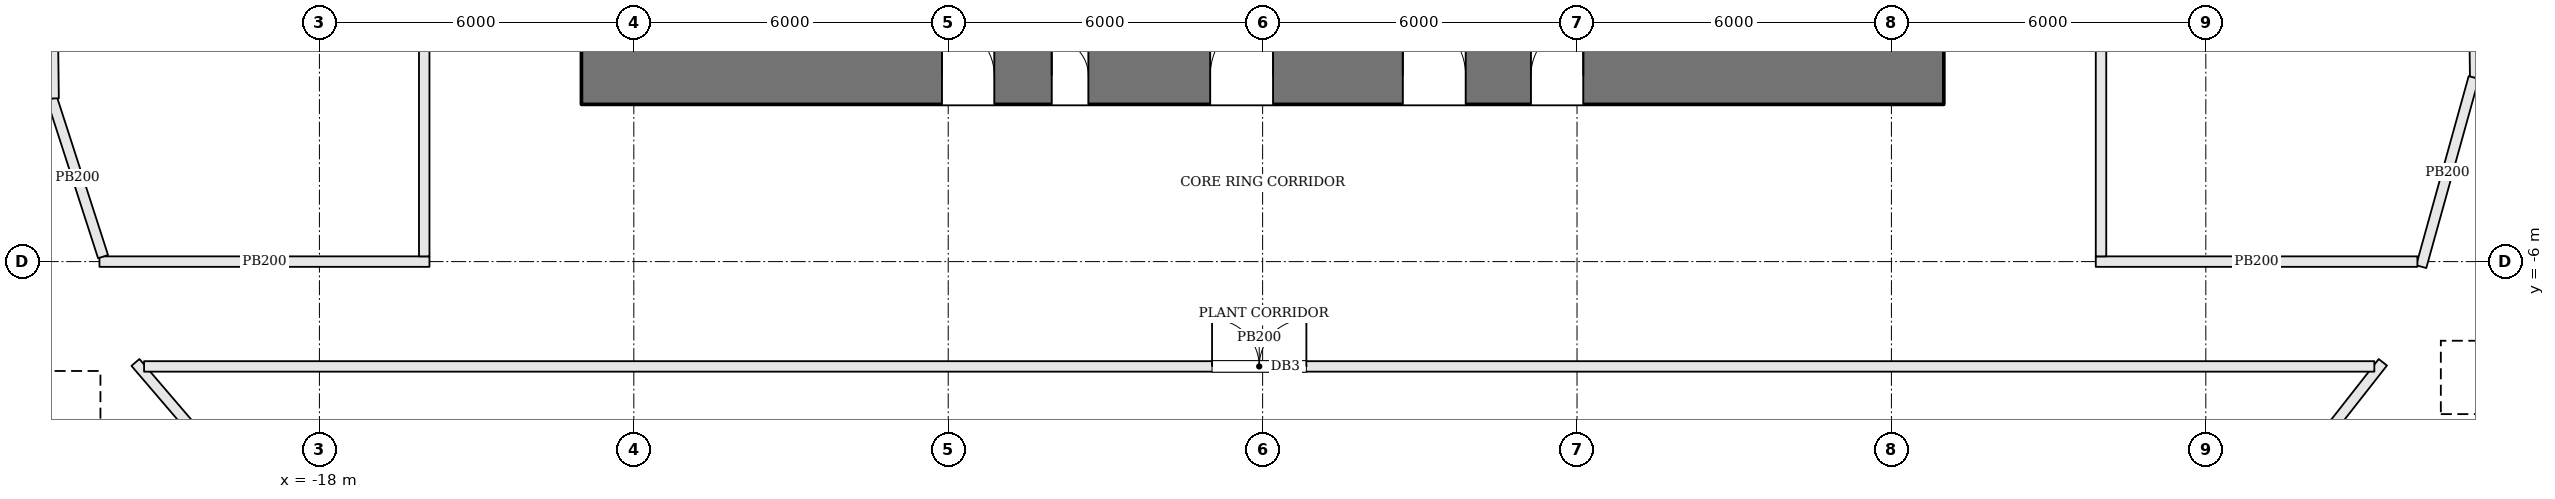
"""IFC4 building model, lengths in metres.
Left out: names, types, materials, properties, quantities, classifications, styles, units other than length and angle.
Written with IfcOpenShell. Run it as: python <this file> out.ifc"""

import sys

from ifc_helpers import new_model, si_unit, direction, frame, frame_2d, origin, origin_2d, place, context, subcontext, project, spatial, rectangle, extrude, element, fill, save


model = new_model("IFC4")
c1 = context("Model", 3, precision=1e-05, world=origin(), true_north=direction((0.0, 1.0)))
c2 = subcontext(c1, "Body", "Model", "MODEL_VIEW")
j1 = project(units=[si_unit("LENGTHUNIT", "METRE"), si_unit("PLANEANGLEUNIT", "RADIAN")], contexts=[c1])
p1 = place(None, origin())
s1 = spatial("IfcSite", under=j1, at=p1, CompositionType="ELEMENT")
p2 = place(p1, origin())
s2 = spatial("IfcBuilding", under=s1, at=p2, CompositionType="ELEMENT")
p3 = place(p2, frame((0.0, 0.0, 77.1)))
s3 = spatial("IfcBuildingStorey", under=s2, at=p3, CompositionType="ELEMENT", Elevation=77.1)
p4 = place(p3, frame((-13.0, -2.45, 0.0), z_axis=(0.0, 0.0, 1.0), x_axis=(1.0, 0.0, 0.0)))
e1 = element("IfcWall", 1, at=p4, inside=s3, PredefinedType="SHEAR", context=c2, shape_type="SweptSolid", body=[
    extrude(rectangle(XDim=26.0, YDim=1.1, at=frame_2d((13.0, 0.0))), origin(), (0.0, 0.0, 1.0), 4.5),
])
p5 = place(p4, frame((8.975, 0.0, 0.0)))
e2 = element("IfcOpeningElement", 2, at=p5, cuts=e1, PredefinedType="OPENING", context=c2, shape_type="SweptSolid", body=[
    extrude(rectangle(XDim=0.7, YDim=2.1, at=frame_2d((0.35, 1.05))), frame((0.0, 0.56, 0.0), z_axis=(0.0, -1.0, 0.0), x_axis=(1.0, 0.0, 0.0)), (0.0, 0.0, 1.0), 1.12),
])
p6 = place(p4, frame((12.0, 0.0, 0.0)))
e3 = element("IfcOpeningElement", 3, at=p6, cuts=e1, PredefinedType="OPENING", context=c2, shape_type="SweptSolid", body=[
    extrude(rectangle(XDim=1.2, YDim=2.1, at=frame_2d((0.6, 1.05))), frame((0.0, 0.56, 0.0), z_axis=(0.0, -1.0, 0.0), x_axis=(1.0, 0.0, 0.0)), (0.0, 0.0, 1.0), 1.12),
])
p7 = place(p4, frame((15.675, 0.0, 0.0)))
e4 = element("IfcOpeningElement", 4, at=p7, cuts=e1, PredefinedType="OPENING", context=c2, shape_type="SweptSolid", body=[
    extrude(rectangle(XDim=1.2, YDim=2.1, at=frame_2d((0.6, 1.05))), frame((0.0, 0.56, 0.0), z_axis=(0.0, -1.0, 0.0), x_axis=(1.0, 0.0, 0.0)), (0.0, 0.0, 1.0), 1.12),
])
p8 = place(p4, frame((6.88, 0.0, 0.0)))
e5 = element("IfcOpeningElement", 5, at=p8, cuts=e1, PredefinedType="OPENING", context=c2, shape_type="SweptSolid", body=[
    extrude(rectangle(XDim=1.0, YDim=2.1, at=frame_2d((0.5, 1.05))), frame((0.0, 0.56, 0.0), z_axis=(0.0, -1.0, 0.0), x_axis=(1.0, 0.0, 0.0)), (0.0, 0.0, 1.0), 1.12),
])
p9 = place(p4, frame((18.12, 0.0, 0.0)))
e6 = element("IfcOpeningElement", 6, at=p9, cuts=e1, PredefinedType="OPENING", context=c2, shape_type="SweptSolid", body=[
    extrude(rectangle(XDim=1.0, YDim=2.1, at=frame_2d((0.5, 1.05))), frame((0.0, 0.56, 0.0), z_axis=(0.0, -1.0, 0.0), x_axis=(1.0, 0.0, 0.0)), (0.0, 0.0, 1.0), 1.12),
])
p10 = place(p3, frame((-24.676, -9.483, -0.49), z_axis=(0.406404807836, 0.157350047865, 0.900042273787), x_axis=(-0.361058075799, 0.932543331915, 0.0)))
e7 = element("IfcColumn", 7, at=p10, inside=s3, PredefinedType="COLUMN", context=c2, shape_type="SweptSolid", body=[
    extrude(rectangle(XDim=1.4, YDim=1.4, at=origin_2d()), origin(), (0.0, 0.0, 1.0), 4.422),
])
p11 = place(p3, frame((25.003, -8.866, -0.489), z_axis=(-0.411038008835, 0.148329187448, 0.899469959167), x_axis=(-0.339439573807, -0.940627862512, 0.0)))
e8 = element("IfcColumn", 8, at=p11, inside=s3, PredefinedType="COLUMN", context=c2, shape_type="SweptSolid", body=[
    extrude(rectangle(XDim=1.4, YDim=1.4, at=origin_2d()), origin(), (0.0, 0.0, 1.0), 4.423),
])
p12 = place(p3, frame((21.378, -7.921, 0.0), z_axis=(0.0, 0.0, 1.0), x_axis=(-0.61707944402, -0.786900857649, 0.0)))
e9 = element("IfcWall", 9, at=p12, inside=s3, PredefinedType="PARTITIONING", context=c2, shape_type="SweptSolid", body=[
    extrude(rectangle(XDim=4.753, YDim=0.2, at=frame_2d((2.376, 0.0))), origin(), (0.0, 0.0, 1.0), 4.3),
])
p13 = place(p3, frame((-18.119, -11.885, 0.0), z_axis=(0.0, 0.0, 1.0), x_axis=(-0.650459744862, 0.759540729858, 0.0)))
e10 = element("IfcWall", 10, at=p13, inside=s3, PredefinedType="PARTITIONING", context=c2, shape_type="SweptSolid", body=[
    extrude(rectangle(XDim=5.215, YDim=0.2, at=frame_2d((2.607, 0.0))), origin(), (0.0, 0.0, 1.0), 4.3),
])
p14 = place(p3, frame((-21.346, -8.0, 0.0), z_axis=(0.0, 0.0, 1.0), x_axis=(1.0, 0.0, 0.0)))
e11 = element("IfcWall", 11, at=p14, inside=s3, PredefinedType="PARTITIONING", context=c2, shape_type="SweptSolid", body=[
    extrude(rectangle(XDim=42.562, YDim=0.2, at=frame_2d((21.281, 0.0))), origin(), (0.0, 0.0, 1.0), 4.3),
])
p15 = place(p14, frame((20.381, 0.0, 0.0)))
e12 = element("IfcOpeningElement", 12, at=p15, cuts=e11, PredefinedType="OPENING", context=c2, shape_type="SweptSolid", body=[
    extrude(rectangle(XDim=1.8, YDim=2.1, at=frame_2d((0.9, 1.05))), frame((0.0, 0.11, 0.0), z_axis=(0.0, -1.0, 0.0), x_axis=(1.0, 0.0, 0.0)), (0.0, 0.0, 1.0), 0.22),
])
p16 = place(p3, frame((-15.9, -6.0, 0.0), z_axis=(0.0, 0.0, 1.0), x_axis=(-1.0, 0.0, 0.0)))
e13 = element("IfcWall", 13, at=p16, inside=s3, PredefinedType="PARTITIONING", context=c2, shape_type="SweptSolid", body=[
    extrude(rectangle(XDim=6.298, YDim=0.2, at=frame_2d((3.149, 0.0))), origin(), (0.0, 0.0, 1.0), 4.3),
])
p17 = place(p3, frame((-22.129, -5.905, 0.0), z_axis=(0.0, 0.0, 1.0), x_axis=(-0.307543224341, 0.951534111402, 0.0)))
e14 = element("IfcWall", 14, at=p17, inside=s3, PredefinedType="PARTITIONING", context=c2, shape_type="SweptSolid", body=[
    extrude(rectangle(XDim=3.167, YDim=0.2, at=frame_2d((1.584, 0.0))), origin(), (0.0, 0.0, 1.0), 4.3),
])
p18 = place(p3, frame((-23.073, -2.886, 0.0), z_axis=(0.0, 0.0, 1.0), x_axis=(-0.012666982201, 0.999919770563, 0.0)))
e15 = element("IfcWall", 15, at=p18, inside=s3, PredefinedType="PARTITIONING", context=c2, shape_type="SweptSolid", body=[
    extrude(rectangle(XDim=5.377, YDim=0.2, at=frame_2d((2.689, 0.0))), origin(), (0.0, 0.0, 1.0), 4.3),
])
p19 = place(p3, frame((-16.0, 13.047, 0.0), z_axis=(0.0, 0.0, 1.0), x_axis=(0.0, -1.0, 0.0)))
e16 = element("IfcWall", 16, at=p19, inside=s3, PredefinedType="PARTITIONING", context=c2, shape_type="SweptSolid", body=[
    extrude(rectangle(XDim=18.947, YDim=0.2, at=frame_2d((9.474, 0.0))), origin(), (0.0, 0.0, 1.0), 4.3),
])
p20 = place(p19, frame((7.647, 0.0, 0.0)))
e17 = element("IfcOpeningElement", 17, at=p20, cuts=e16, PredefinedType="OPENING", context=c2, shape_type="SweptSolid", body=[
    extrude(rectangle(XDim=1.8, YDim=2.1, at=frame_2d((0.9, 1.05))), frame((0.0, 0.11, 0.0), z_axis=(0.0, -1.0, 0.0), x_axis=(1.0, 0.0, 0.0)), (0.0, 0.0, 1.0), 0.22),
])
p21 = place(p3, frame((23.073, 2.886, 0.0), z_axis=(0.0, 0.0, 1.0), x_axis=(0.012666982201, -0.999919770563, 0.0)))
e18 = element("IfcWall", 18, at=p21, inside=s3, PredefinedType="PARTITIONING", context=c2, shape_type="SweptSolid", body=[
    extrude(rectangle(XDim=5.377, YDim=0.2, at=frame_2d((2.689, 0.0))), origin(), (0.0, 0.0, 1.0), 4.3),
])
p22 = place(p3, frame((23.113, -2.487, 0.0), z_axis=(0.0, 0.0, 1.0), x_axis=(-0.2675161078, -0.963553388281, 0.0)))
e19 = element("IfcWall", 19, at=p22, inside=s3, PredefinedType="PARTITIONING", context=c2, shape_type="SweptSolid", body=[
    extrude(rectangle(XDim=3.745, YDim=0.2, at=frame_2d((1.873, 0.0))), origin(), (0.0, 0.0, 1.0), 4.3),
])
p23 = place(p3, frame((22.038, -6.0, 0.0), z_axis=(0.0, 0.0, 1.0), x_axis=(-1.0, 0.0, 0.0)))
e20 = element("IfcWall", 20, at=p23, inside=s3, PredefinedType="PARTITIONING", context=c2, shape_type="SweptSolid", body=[
    extrude(rectangle(XDim=6.138, YDim=0.2, at=frame_2d((3.069, 0.0))), origin(), (0.0, 0.0, 1.0), 4.3),
])
p24 = place(p3, frame((16.0, -5.9, 0.0), z_axis=(0.0, 0.0, 1.0), x_axis=(0.0, 1.0, 0.0)))
e21 = element("IfcWall", 21, at=p24, inside=s3, PredefinedType="PARTITIONING", context=c2, shape_type="SweptSolid", body=[
    extrude(rectangle(XDim=18.952, YDim=0.2, at=frame_2d((9.476, 0.0))), origin(), (0.0, 0.0, 1.0), 4.3),
])
p25 = place(p24, frame((9.5, 0.0, 0.0)))
e22 = element("IfcOpeningElement", 22, at=p25, cuts=e21, PredefinedType="OPENING", context=c2, shape_type="SweptSolid", body=[
    extrude(rectangle(XDim=1.8, YDim=2.1, at=frame_2d((0.9, 1.05))), frame((0.0, 0.11, 0.0), z_axis=(0.0, -1.0, 0.0), x_axis=(1.0, 0.0, 0.0)), (0.0, 0.0, 1.0), 0.22),
])
p26 = place(p5, origin())
e23 = element("IfcDoor", 23, at=p26, inside=s3, OperationType="SINGLE_SWING_LEFT", PredefinedType="DOOR", context=c2, shape_type="SweptSolid", body=[
    extrude(rectangle(XDim=0.7, YDim=2.1, at=frame_2d((0.35, 1.05))), frame((0.0, 0.025, 0.0), z_axis=(0.0, -1.0, 0.0), x_axis=(1.0, 0.0, 0.0)), (0.0, 0.0, 1.0), 0.05),
])
fill(e2, e23)
p27 = place(p6, origin())
e24 = element("IfcDoor", 24, at=p27, inside=s3, OperationType="SINGLE_SWING_RIGHT", PredefinedType="DOOR", context=c2, shape_type="SweptSolid", body=[
    extrude(rectangle(XDim=1.2, YDim=2.1, at=frame_2d((0.6, 1.05))), frame((0.0, 0.025, 0.0), z_axis=(0.0, -1.0, 0.0), x_axis=(1.0, 0.0, 0.0)), (0.0, 0.0, 1.0), 0.05),
])
fill(e3, e24)
p28 = place(p7, origin())
e25 = element("IfcDoor", 25, at=p28, inside=s3, OperationType="SINGLE_SWING_LEFT", PredefinedType="DOOR", context=c2, shape_type="SweptSolid", body=[
    extrude(rectangle(XDim=1.2, YDim=2.1, at=frame_2d((0.6, 1.05))), frame((0.0, 0.025, 0.0), z_axis=(0.0, -1.0, 0.0), x_axis=(1.0, 0.0, 0.0)), (0.0, 0.0, 1.0), 0.05),
])
fill(e4, e25)
p29 = place(p8, origin())
e26 = element("IfcDoor", 26, at=p29, inside=s3, OperationType="SINGLE_SWING_LEFT", PredefinedType="DOOR", context=c2, shape_type="SweptSolid", body=[
    extrude(rectangle(XDim=1.0, YDim=2.1, at=frame_2d((0.5, 1.05))), frame((0.0, 0.025, 0.0), z_axis=(0.0, -1.0, 0.0), x_axis=(1.0, 0.0, 0.0)), (0.0, 0.0, 1.0), 0.05),
])
fill(e5, e26)
p30 = place(p9, origin())
e27 = element("IfcDoor", 27, at=p30, inside=s3, OperationType="SINGLE_SWING_RIGHT", PredefinedType="DOOR", context=c2, shape_type="SweptSolid", body=[
    extrude(rectangle(XDim=1.0, YDim=2.1, at=frame_2d((0.5, 1.05))), frame((0.0, 0.025, 0.0), z_axis=(0.0, -1.0, 0.0), x_axis=(1.0, 0.0, 0.0)), (0.0, 0.0, 1.0), 0.05),
])
fill(e6, e27)
p31 = place(p15, origin())
e28 = element("IfcDoor", 28, at=p31, inside=s3, OperationType="DOUBLE_DOOR_SINGLE_SWING", PredefinedType="DOOR", context=c2, shape_type="SweptSolid", body=[
    extrude(rectangle(XDim=1.8, YDim=2.1, at=frame_2d((0.9, 1.05))), frame((0.0, 0.025, 0.0), z_axis=(0.0, -1.0, 0.0), x_axis=(1.0, 0.0, 0.0)), (0.0, 0.0, 1.0), 0.05),
])
fill(e12, e28)
save(model, sys.argv[1])
